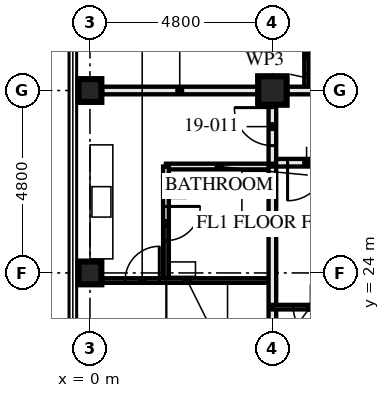
"""IFC4 building model, lengths in metres.
Left out: names, types, materials, properties, quantities, classifications, styles, units other than length and angle.
Written with IfcOpenShell. Run it as: python <this file> out.ifc"""

import sys

from ifc_helpers import new_model, si_unit, direction, frame, frame_2d, origin, origin_2d, place, context, subcontext, project, spatial, rectangle, hollow_rectangle, extrude, element, fill, save


model = new_model("IFC4")
c1 = context("Model", 3, precision=1e-05, world=origin(), true_north=direction((0.0, 1.0)))
c2 = subcontext(c1, "Body", "Model", "MODEL_VIEW")
j1 = project(units=[si_unit("LENGTHUNIT", "METRE"), si_unit("PLANEANGLEUNIT", "RADIAN")], contexts=[c1])
p1 = place(None, origin())
s1 = spatial("IfcSite", under=j1, at=p1, CompositionType="ELEMENT")
p2 = place(p1, origin())
s2 = spatial("IfcBuilding", under=s1, at=p2, CompositionType="ELEMENT")
p3 = place(p2, frame((0.0, 0.0, 72.5)))
s3 = spatial("IfcBuildingStorey", under=s2, at=p3, CompositionType="ELEMENT", Elevation=72.5)
for number, where, z_axis, x_axis in (
    (1, (0.0, 24.0, 0.0), (0.0, 0.0, 1.0), (1.0, 0.0, 0.0)),
    (2, (0.0, 28.8, 0.0), (0.0, 0.0, 1.0), (0.0, 1.0, 0.0)),
):
    element("IfcColumn", number, at=place(p3, frame(where, z_axis=z_axis, x_axis=x_axis)), inside=s3, PredefinedType="COLUMN", context=c2, shape_type="SweptSolid", body=[
        extrude(hollow_rectangle(XDim=0.6, YDim=0.6, WallThickness=0.08, at=origin_2d()), origin(), (0.0, 0.0, 1.0), 3.5),
    ])
p4 = place(p3, frame((4.8, 28.8, 0.0), z_axis=(0.0, 0.0, 1.0), x_axis=(0.0, 1.0, 0.0)))
e3 = element("IfcColumn", 3, at=p4, inside=s3, PredefinedType="COLUMN", context=c2, shape_type="SweptSolid", body=[
    extrude(hollow_rectangle(XDim=0.75, YDim=0.75, WallThickness=0.08, at=origin_2d()), origin(), (0.0, 0.0, 1.0), 3.5),
])
p5 = place(p3, frame((2.0, 23.8, 0.0), z_axis=(0.0, 0.0, 1.0), x_axis=(0.0, 1.0, 0.0)))
e4 = element("IfcWall", 4, at=p5, inside=s3, PredefinedType="PARTITIONING", context=c2, shape_type="SweptSolid", body=[
    extrude(rectangle(XDim=3.0, YDim=0.15, at=frame_2d((1.5, 0.0))), origin(), (0.0, 0.0, 1.0), 2.55),
])
p6 = place(p5, frame((1.05, 0.0, 0.0)))
e5 = element("IfcOpeningElement", 5, at=p6, cuts=e4, PredefinedType="OPENING", context=c2, shape_type="SweptSolid", body=[
    extrude(rectangle(XDim=0.9, YDim=2.1, at=frame_2d((0.45, 1.05))), frame((0.0, 0.085, 0.0), z_axis=(0.0, -1.0, 0.0), x_axis=(1.0, 0.0, 0.0)), (0.0, 0.0, 1.0), 0.171),
])
p7 = place(p3, frame((2.0, 26.8, 0.0), z_axis=(0.0, 0.0, 1.0), x_axis=(1.0, 0.0, 0.0)))
e6 = element("IfcWall", 6, at=p7, inside=s3, PredefinedType="PARTITIONING", context=c2, shape_type="SweptSolid", body=[
    extrude(rectangle(XDim=2.8, YDim=0.15, at=frame_2d((1.4, 0.0))), origin(), (0.0, 0.0, 1.0), 3.33),
])
p8 = place(p3, frame((0.32, 23.8, 0.0), z_axis=(0.0, 0.0, 1.0), x_axis=(1.0, 0.0, 0.0)))
e7 = element("IfcWall", 7, at=p8, inside=s3, PredefinedType="PARTITIONING", context=c2, shape_type="SweptSolid", body=[
    extrude(rectangle(XDim=4.48, YDim=0.12, at=frame_2d((2.24, 0.0))), origin(), (0.0, 0.0, 1.0), 3.33),
])
p9 = place(p8, frame((0.605, 0.0, 0.0)))
e8 = element("IfcOpeningElement", 8, at=p9, cuts=e7, PredefinedType="OPENING", context=c2, shape_type="SweptSolid", body=[
    extrude(rectangle(XDim=0.9, YDim=2.1, at=frame_2d((0.45, 1.05))), frame((0.0, 0.071, 0.0), z_axis=(0.0, -1.0, 0.0), x_axis=(1.0, 0.0, 0.0)), (0.0, 0.0, 1.0), 0.141),
])
p10 = place(p3, frame((4.8, 19.52, 0.0), z_axis=(0.0, 0.0, 1.0), x_axis=(0.0, 1.0, 0.0)))
e9 = element("IfcWall", 9, at=p10, inside=s3, PredefinedType="PARTITIONING", context=c2, shape_type="SweptSolid", body=[
    extrude(rectangle(XDim=7.28, YDim=0.2, at=frame_2d((3.64, 0.0))), origin(), (0.0, 0.0, 1.0), 2.55),
])
p11 = place(p3, frame((4.8, 23.1, 0.0), z_axis=(0.0, 0.0, 1.0), x_axis=(1.0, 0.0, 0.0)))
e10 = element("IfcWall", 10, at=p11, inside=s3, PredefinedType="PARTITIONING", context=c2, shape_type="SweptSolid", body=[
    extrude(rectangle(XDim=2.0, YDim=0.12, at=frame_2d((1.0, 0.0))), origin(), (0.0, 0.0, 1.0), 3.33),
])
p12 = place(p11, frame((0.55, 0.0, 0.0)))
e11 = element("IfcOpeningElement", 11, at=p12, cuts=e10, PredefinedType="OPENING", context=c2, shape_type="SweptSolid", body=[
    extrude(rectangle(XDim=0.9, YDim=2.1, at=frame_2d((0.45, 1.05))), frame((0.0, 0.071, 0.0), z_axis=(0.0, -1.0, 0.0), x_axis=(1.0, 0.0, 0.0)), (0.0, 0.0, 1.0), 0.141),
])
p13 = place(p3, frame((4.8, 26.9, 0.0), z_axis=(0.0, 0.0, 1.0), x_axis=(1.0, 0.0, 0.0)))
e12 = element("IfcWall", 12, at=p13, inside=s3, PredefinedType="PARTITIONING", context=c2, shape_type="SweptSolid", body=[
    extrude(rectangle(XDim=9.6, YDim=0.2, at=frame_2d((4.8, 0.0))), origin(), (0.0, 0.0, 1.0), 3.33),
])
p14 = place(p13, frame((0.4, 0.0, 0.0)))
e13 = element("IfcOpeningElement", 13, at=p14, cuts=e12, PredefinedType="OPENING", context=c2, shape_type="SweptSolid", body=[
    extrude(rectangle(XDim=1.0, YDim=2.1, at=frame_2d((0.5, 1.05))), frame((0.0, 0.111, 0.0), z_axis=(0.0, -1.0, 0.0), x_axis=(1.0, 0.0, 0.0)), (0.0, 0.0, 1.0), 0.221),
])
p15 = place(p13, frame((5.2, 0.0, 0.0)))
e14 = element("IfcOpeningElement", 14, at=p15, cuts=e12, PredefinedType="OPENING", context=c2, shape_type="SweptSolid", body=[
    extrude(rectangle(XDim=1.0, YDim=2.1, at=frame_2d((0.5, 1.05))), frame((0.0, 0.111, 0.0), z_axis=(0.0, -1.0, 0.0), x_axis=(1.0, 0.0, 0.0)), (0.0, 0.0, 1.0), 0.221),
])
p16 = place(p3, frame((4.8, 26.8, 0.0), z_axis=(0.0, 0.0, 1.0), x_axis=(0.0, 1.0, 0.0)))
e15 = element("IfcWall", 15, at=p16, inside=s3, PredefinedType="PARTITIONING", context=c2, shape_type="SweptSolid", body=[
    extrude(rectangle(XDim=1.605, YDim=0.2, at=frame_2d((0.802, 0.0))), origin(), (0.0, 0.0, 1.0), 3.33),
])
p17 = place(p16, frame((0.55, 0.0, 0.0)))
e16 = element("IfcOpeningElement", 16, at=p17, cuts=e15, PredefinedType="OPENING", context=c2, shape_type="SweptSolid", body=[
    extrude(rectangle(XDim=1.0, YDim=2.1, at=frame_2d((0.5, 1.05))), frame((0.0, 0.111, 0.0), z_axis=(0.0, -1.0, 0.0), x_axis=(1.0, 0.0, 0.0)), (0.0, 0.0, 1.0), 0.221),
])
p18 = place(p3, frame((5.7, 33.6, 0.0), z_axis=(0.0, 0.0, 1.0), x_axis=(0.0, -1.0, 0.0)))
e17 = element("IfcWall", 17, at=p18, inside=s3, PredefinedType="PARTITIONING", context=c2, shape_type="SweptSolid", body=[
    extrude(rectangle(XDim=4.8, YDim=0.12, at=frame_2d((2.4, 0.0))), origin(), (0.0, 0.0, 1.0), 3.33),
])
p19 = place(p18, frame((3.45, 0.0, 0.0)))
e18 = element("IfcOpeningElement", 18, at=p19, cuts=e17, PredefinedType="OPENING", context=c2, shape_type="SweptSolid", body=[
    extrude(rectangle(XDim=0.9, YDim=2.1, at=frame_2d((0.45, 1.05))), frame((0.0, 0.071, 0.0), z_axis=(0.0, -1.0, 0.0), x_axis=(1.0, 0.0, 0.0)), (0.0, 0.0, 1.0), 0.141),
])
p20 = place(p3, frame((9.205, 28.8, 0.0), z_axis=(0.0, 0.0, 1.0), x_axis=(-1.0, 0.0, 0.0)))
e19 = element("IfcWall", 19, at=p20, inside=s3, PredefinedType="PARTITIONING", context=c2, shape_type="SweptSolid", body=[
    extrude(rectangle(XDim=4.01, YDim=0.2, at=frame_2d((2.005, 0.0))), origin(), (0.0, 0.0, 1.0), 2.32),
])
p21 = place(p3, frame((4.405, 28.8, 0.0), z_axis=(0.0, 0.0, 1.0), x_axis=(-1.0, 0.0, 0.0)))
e20 = element("IfcWall", 20, at=p21, inside=s3, PredefinedType="PARTITIONING", context=c2, shape_type="SweptSolid", body=[
    extrude(rectangle(XDim=4.085, YDim=0.2, at=frame_2d((2.042, 0.0))), origin(), (0.0, 0.0, 1.0), 2.32),
])
p22 = place(p6, frame((0.9, 0.0, 0.0), z_axis=(0.0, 0.0, 1.0), x_axis=(-1.0, 0.0, 0.0)))
e21 = element("IfcDoor", 21, at=p22, inside=s3, OperationType="SINGLE_SWING_RIGHT", PredefinedType="DOOR", context=c2, shape_type="SweptSolid", body=[
    extrude(rectangle(XDim=0.9, YDim=2.1, at=frame_2d((0.45, 1.05))), frame((0.0, 0.022, 0.0), z_axis=(0.0, -1.0, 0.0), x_axis=(1.0, 0.0, 0.0)), (0.0, 0.0, 1.0), 0.044),
])
fill(e5, e21)
p23 = place(p9, origin())
e22 = element("IfcDoor", 22, at=p23, inside=s3, OperationType="SINGLE_SWING_LEFT", PredefinedType="DOOR", context=c2, shape_type="SweptSolid", body=[
    extrude(rectangle(XDim=0.9, YDim=2.1, at=frame_2d((0.45, 1.05))), frame((0.0, 0.022, 0.0), z_axis=(0.0, -1.0, 0.0), x_axis=(1.0, 0.0, 0.0)), (0.0, 0.0, 1.0), 0.044),
])
fill(e8, e22)
p24 = place(p12, frame((0.9, 0.0, 0.0), z_axis=(0.0, 0.0, 1.0), x_axis=(-1.0, 0.0, 0.0)))
e23 = element("IfcDoor", 23, at=p24, inside=s3, OperationType="SINGLE_SWING_RIGHT", PredefinedType="DOOR", context=c2, shape_type="SweptSolid", body=[
    extrude(rectangle(XDim=0.9, YDim=2.1, at=frame_2d((0.45, 1.05))), frame((0.0, 0.022, 0.0), z_axis=(0.0, -1.0, 0.0), x_axis=(1.0, 0.0, 0.0)), (0.0, 0.0, 1.0), 0.044),
])
fill(e11, e23)
p25 = place(p14, frame((1.0, 0.0, 0.0), z_axis=(0.0, 0.0, 1.0), x_axis=(-1.0, 0.0, 0.0)))
e24 = element("IfcDoor", 24, at=p25, inside=s3, OperationType="SINGLE_SWING_LEFT", PredefinedType="DOOR", context=c2, shape_type="SweptSolid", body=[
    extrude(rectangle(XDim=1.0, YDim=2.1, at=frame_2d((0.5, 1.05))), frame((0.0, 0.027, 0.0), z_axis=(0.0, -1.0, 0.0), x_axis=(1.0, 0.0, 0.0)), (0.0, 0.0, 1.0), 0.054),
])
fill(e13, e24)
p26 = place(p17, origin())
e25 = element("IfcDoor", 25, at=p26, inside=s3, OperationType="SINGLE_SWING_LEFT", PredefinedType="DOOR", context=c2, shape_type="SweptSolid", body=[
    extrude(rectangle(XDim=1.0, YDim=2.1, at=frame_2d((0.5, 1.05))), frame((0.0, 0.027, 0.0), z_axis=(0.0, -1.0, 0.0), x_axis=(1.0, 0.0, 0.0)), (0.0, 0.0, 1.0), 0.054),
])
fill(e16, e25)
p27 = place(p19, origin())
e26 = element("IfcDoor", 26, at=p27, inside=s3, OperationType="SINGLE_SWING_LEFT", PredefinedType="DOOR", context=c2, shape_type="SweptSolid", body=[
    extrude(rectangle(XDim=0.9, YDim=2.1, at=frame_2d((0.45, 1.05))), frame((0.0, 0.022, 0.0), z_axis=(0.0, -1.0, 0.0), x_axis=(1.0, 0.0, 0.0)), (0.0, 0.0, 1.0), 0.044),
])
fill(e18, e26)
save(model, sys.argv[1])
